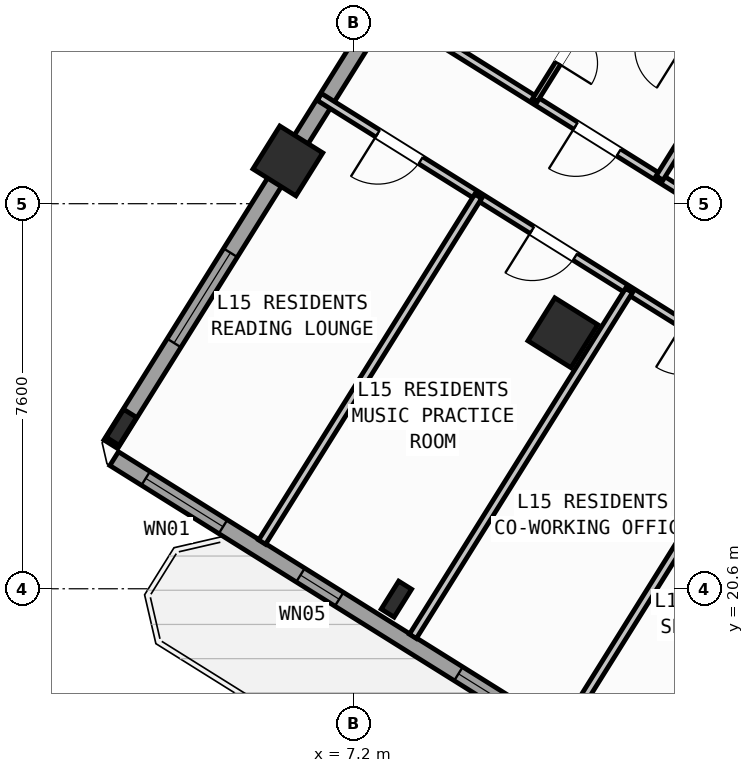
"""IFC4 building model, lengths in metres.
Left out: names, types, materials, properties, quantities, classifications, styles, units other than length and angle.
Written with IfcOpenShell. Run it as: python <this file> out.ifc"""

import sys

from ifc_helpers import new_model, si_unit, direction, frame, frame_2d, origin, origin_2d, place, context, subcontext, project, spatial, rectangle, hollow_rectangle, i_section, extrude, source, transform, mapped, element, fill, save


model = new_model("IFC4")
c1 = context("Model", 3, precision=1e-05, world=origin(), true_north=direction((0.0, 1.0)))
c2 = subcontext(c1, "Body", "Model", "MODEL_VIEW")
j1 = project(units=[si_unit("LENGTHUNIT", "METRE"), si_unit("PLANEANGLEUNIT", "RADIAN")], contexts=[c1])
p1 = place(None, origin())
s1 = spatial("IfcSite", under=j1, at=p1, CompositionType="ELEMENT")
p2 = place(p1, origin())
s2 = spatial("IfcBuilding", under=s1, at=p2, CompositionType="ELEMENT")
p3 = place(p2, frame((0.0, 0.0, 60.0)))
s3 = spatial("IfcBuildingStorey", under=s2, at=p3, CompositionType="ELEMENT", Elevation=60.0)
m1 = source(origin(), c2, "Body", "SweptSolid", [
    extrude(hollow_rectangle(XDim=1.0, YDim=1.0, WallThickness=0.04, at=origin_2d()), origin(), (0.0, 0.0, 1.0), 3.6),
])
p4 = place(p3, frame((11.336, 25.653, 0.0), z_axis=(0.0, 0.0, 1.0), x_axis=(-0.848048096156, 0.529919264233, 0.0)))
e1 = element("IfcColumn", 1, at=p4, inside=s3, PredefinedType="COLUMN", context=c2, shape_type="MappedRepresentation", body=[
    mapped(m1, transform((0.0, 0.0, 0.0), scale=1.0)),
])
m2 = source(origin(), c2, "Body", "SweptSolid", [
    extrude(i_section(OverallWidth=0.3, OverallDepth=0.65, WebThickness=0.016, FlangeThickness=0.031, at=origin_2d()), origin(), (0.0, 0.0, 1.0), 3.6),
])
p5 = place(p3, frame((8.051, 20.395, 0.0), z_axis=(0.0, 0.0, 1.0), x_axis=(-0.848048096156, 0.529919264233, 0.0)))
e2 = element("IfcColumn", 2, at=p5, inside=s3, PredefinedType="COLUMN", context=c2, shape_type="MappedRepresentation", body=[
    mapped(m2, transform((0.0, 0.0, 0.0), scale=1.0)),
])
p6 = place(p3, frame((5.909, 29.044, 0.0), z_axis=(0.0, 0.0, 1.0), x_axis=(-0.848048096156, 0.529919264233, 0.0)))
e3 = element("IfcColumn", 3, at=p6, inside=s3, PredefinedType="COLUMN", context=c2, shape_type="MappedRepresentation", body=[
    mapped(m1, transform((0.0, 0.0, 0.0), scale=1.0)),
])
p7 = place(p3, frame((2.623, 23.786, 0.0), z_axis=(0.0, 0.0, 1.0), x_axis=(-0.848048096156, 0.529919264233, 0.0)))
e4 = element("IfcColumn", 4, at=p7, inside=s3, PredefinedType="COLUMN", context=c2, shape_type="MappedRepresentation", body=[
    mapped(m2, transform((0.0, 0.0, 0.0), scale=1.0)),
])
p8 = place(p3, frame((29.268, 6.429, 0.0), z_axis=(0.0, 0.0, 1.0), x_axis=(-0.848049971435, 0.529916263149, 0.0)))
e5 = element("IfcWall", 5, at=p8, inside=s3, PredefinedType="STANDARD", context=c2, shape_type="SweptSolid", body=[
    extrude(rectangle(XDim=31.588, YDim=0.32, at=frame_2d((15.794, 0.0))), origin(), (0.0, 0.0, 1.0), 3.35),
])
p9 = place(p8, frame((16.235, 0.0, 0.0)))
e6 = element("IfcOpeningElement", 6, at=p9, cuts=e5, PredefinedType="OPENING", context=c2, shape_type="SweptSolid", body=[
    extrude(rectangle(XDim=1.2, YDim=2.15, at=frame_2d((0.6, 1.075))), frame((0.0, 0.17, 0.0), z_axis=(0.0, -1.0, 0.0), x_axis=(1.0, 0.0, 0.0)), (0.0, 0.0, 1.0), 0.34),
])
p10 = place(p8, frame((2.989, 0.0, 0.8)))
e7 = element("IfcOpeningElement", 7, at=p10, cuts=e5, PredefinedType="OPENING", context=c2, shape_type="SweptSolid", body=[
    extrude(rectangle(XDim=2.1, YDim=1.55, at=frame_2d((1.05, 0.775))), frame((0.0, 0.17, 0.0), z_axis=(0.0, -1.0, 0.0), x_axis=(1.0, 0.0, 0.0)), (0.0, 0.0, 1.0), 0.34),
])
p11 = place(p8, frame((8.359, 0.0, 0.8)))
e8 = element("IfcOpeningElement", 8, at=p11, cuts=e5, PredefinedType="OPENING", context=c2, shape_type="SweptSolid", body=[
    extrude(rectangle(XDim=2.1, YDim=1.55, at=frame_2d((1.05, 0.775))), frame((0.0, 0.17, 0.0), z_axis=(0.0, -1.0, 0.0), x_axis=(1.0, 0.0, 0.0)), (0.0, 0.0, 1.0), 0.34),
])
p12 = place(p8, frame((13.284, 0.0, 0.95)))
e9 = element("IfcOpeningElement", 9, at=p12, cuts=e5, PredefinedType="OPENING", context=c2, shape_type="SweptSolid", body=[
    extrude(rectangle(XDim=1.2, YDim=1.4, at=frame_2d((0.6, 0.7))), frame((0.0, 0.17, 0.0), z_axis=(0.0, -1.0, 0.0), x_axis=(1.0, 0.0, 0.0)), (0.0, 0.0, 1.0), 0.34),
])
p13 = place(p8, frame((22.374, 0.0, 0.95)))
e10 = element("IfcOpeningElement", 10, at=p13, cuts=e5, PredefinedType="OPENING", context=c2, shape_type="SweptSolid", body=[
    extrude(rectangle(XDim=1.2, YDim=1.4, at=frame_2d((0.6, 0.7))), frame((0.0, 0.17, 0.0), z_axis=(0.0, -1.0, 0.0), x_axis=(1.0, 0.0, 0.0)), (0.0, 0.0, 1.0), 0.34),
])
p14 = place(p8, frame((26.351, 0.0, 1.0)))
e11 = element("IfcOpeningElement", 11, at=p14, cuts=e5, PredefinedType="OPENING", context=c2, shape_type="SweptSolid", body=[
    extrude(rectangle(XDim=0.9, YDim=1.25, at=frame_2d((0.45, 0.625))), frame((0.0, 0.17, 0.0), z_axis=(0.0, -1.0, 0.0), x_axis=(1.0, 0.0, 0.0)), (0.0, 0.0, 1.0), 0.34),
])
p15 = place(p8, frame((29.052, 0.0, 0.85)))
e12 = element("IfcOpeningElement", 12, at=p15, cuts=e5, PredefinedType="OPENING", context=c2, shape_type="SweptSolid", body=[
    extrude(rectangle(XDim=1.8, YDim=1.5, at=frame_2d((0.9, 0.75))), frame((0.0, 0.17, 0.0), z_axis=(0.0, -1.0, 0.0), x_axis=(1.0, 0.0, 0.0)), (0.0, 0.0, 1.0), 0.34),
])
p16 = place(p3, frame((2.415, 23.452, 0.0), z_axis=(0.0, 0.0, 1.0), x_axis=(0.52991049553, 0.848053575387, 0.0)))
e13 = element("IfcWall", 13, at=p16, inside=s3, PredefinedType="STANDARD", context=c2, shape_type="SweptSolid", body=[
    extrude(rectangle(XDim=21.587, YDim=0.32, at=frame_2d((10.794, 0.0))), origin(), (0.0, 0.0, 1.0), 2.725),
])
p17 = place(p16, frame((2.356, 0.0, 0.8)))
e14 = element("IfcOpeningElement", 14, at=p17, cuts=e13, PredefinedType="OPENING", context=c2, shape_type="SweptSolid", body=[
    extrude(rectangle(XDim=2.1, YDim=1.55, at=frame_2d((1.05, 0.775))), frame((0.0, 0.17, 0.0), z_axis=(0.0, -1.0, 0.0), x_axis=(1.0, 0.0, 0.0)), (0.0, 0.0, 1.0), 0.34),
])
p18 = place(p16, frame((10.949, 0.0, 1.0)))
e15 = element("IfcOpeningElement", 15, at=p18, cuts=e13, PredefinedType="OPENING", context=c2, shape_type="SweptSolid", body=[
    extrude(rectangle(XDim=0.9, YDim=1.25, at=frame_2d((0.45, 0.625))), frame((0.0, 0.17, 0.0), z_axis=(0.0, -1.0, 0.0), x_axis=(1.0, 0.0, 0.0)), (0.0, 0.0, 1.0), 0.34),
])
p19 = place(p16, frame((15.394, 0.0, 0.85)))
e16 = element("IfcOpeningElement", 16, at=p19, cuts=e13, PredefinedType="OPENING", context=c2, shape_type="SweptSolid", body=[
    extrude(rectangle(XDim=1.5, YDim=1.5, at=frame_2d((0.75, 0.75))), frame((0.0, 0.17, 0.0), z_axis=(0.0, -1.0, 0.0), x_axis=(1.0, 0.0, 0.0)), (0.0, 0.0, 1.0), 0.34),
])
p20 = place(p16, frame((18.194, 0.0, 0.85)))
e17 = element("IfcOpeningElement", 17, at=p20, cuts=e13, PredefinedType="OPENING", context=c2, shape_type="SweptSolid", body=[
    extrude(rectangle(XDim=1.5, YDim=1.5, at=frame_2d((0.75, 0.75))), frame((0.0, 0.17, 0.0), z_axis=(0.0, -1.0, 0.0), x_axis=(1.0, 0.0, 0.0)), (0.0, 0.0, 1.0), 0.34),
])
p21 = place(p3, frame((21.885, 23.306, 0.0), z_axis=(0.0, 0.0, 1.0), x_axis=(-0.848052408131, 0.529912363569, 0.0)))
e18 = element("IfcWall", 18, at=p21, inside=s3, PredefinedType="PARTITIONING", context=c2, shape_type="SweptSolid", body=[
    extrude(rectangle(XDim=16.73, YDim=0.16, at=frame_2d((8.365, 0.0))), origin(), (0.0, 0.0, 1.0), 3.34),
])
p22 = place(p21, frame((1.395, 0.0, 0.0)))
e19 = element("IfcOpeningElement", 19, at=p22, cuts=e18, PredefinedType="OPENING", context=c2, shape_type="SweptSolid", body=[
    extrude(rectangle(XDim=1.0, YDim=2.1, at=frame_2d((0.5, 1.05))), frame((0.0, 0.09, 0.0), z_axis=(0.0, -1.0, 0.0), x_axis=(1.0, 0.0, 0.0)), (0.0, 0.0, 1.0), 0.18),
])
p23 = place(p21, frame((7.82, 0.0, 0.0)))
e20 = element("IfcOpeningElement", 20, at=p23, cuts=e18, PredefinedType="OPENING", context=c2, shape_type="SweptSolid", body=[
    extrude(rectangle(XDim=1.0, YDim=2.1, at=frame_2d((0.5, 1.05))), frame((0.0, 0.09, 0.0), z_axis=(0.0, -1.0, 0.0), x_axis=(1.0, 0.0, 0.0)), (0.0, 0.0, 1.0), 0.18),
])
p24 = place(p21, frame((11.14, 0.0, 0.0)))
e21 = element("IfcOpeningElement", 21, at=p24, cuts=e18, PredefinedType="OPENING", context=c2, shape_type="SweptSolid", body=[
    extrude(rectangle(XDim=1.0, YDim=2.1, at=frame_2d((0.5, 1.05))), frame((0.0, 0.09, 0.0), z_axis=(0.0, -1.0, 0.0), x_axis=(1.0, 0.0, 0.0)), (0.0, 0.0, 1.0), 0.18),
])
p25 = place(p3, frame((20.719, 21.44, 0.0), z_axis=(0.0, 0.0, 1.0), x_axis=(-0.848048310262, 0.529918921593, 0.0)))
e22 = element("IfcWall", 22, at=p25, inside=s3, PredefinedType="PARTITIONING", context=c2, shape_type="SweptSolid", body=[
    extrude(rectangle(XDim=16.73, YDim=0.16, at=frame_2d((8.365, 0.0))), origin(), (0.0, 0.0, 1.0), 3.34),
])
p26 = place(p25, frame((0.92, 0.0, 0.0)))
e23 = element("IfcOpeningElement", 23, at=p26, cuts=e22, PredefinedType="OPENING", context=c2, shape_type="SweptSolid", body=[
    extrude(rectangle(XDim=1.0, YDim=2.1, at=frame_2d((0.5, 1.05))), frame((0.0, 0.09, 0.0), z_axis=(0.0, -1.0, 0.0), x_axis=(1.0, 0.0, 0.0)), (0.0, 0.0, 1.0), 0.18),
])
p27 = place(p25, frame((4.408, 0.0, 0.0)))
e24 = element("IfcOpeningElement", 24, at=p27, cuts=e22, PredefinedType="OPENING", context=c2, shape_type="SweptSolid", body=[
    extrude(rectangle(XDim=1.0, YDim=2.1, at=frame_2d((0.5, 1.05))), frame((0.0, 0.09, 0.0), z_axis=(0.0, -1.0, 0.0), x_axis=(1.0, 0.0, 0.0)), (0.0, 0.0, 1.0), 0.18),
])
p28 = place(p25, frame((7.271, 0.0, 0.0)))
e25 = element("IfcOpeningElement", 25, at=p28, cuts=e22, PredefinedType="OPENING", context=c2, shape_type="SweptSolid", body=[
    extrude(rectangle(XDim=1.0, YDim=2.1, at=frame_2d((0.5, 1.05))), frame((0.0, 0.09, 0.0), z_axis=(0.0, -1.0, 0.0), x_axis=(1.0, 0.0, 0.0)), (0.0, 0.0, 1.0), 0.18),
])
p29 = place(p25, frame((10.78, 0.0, 0.0)))
e26 = element("IfcOpeningElement", 26, at=p29, cuts=e22, PredefinedType="OPENING", context=c2, shape_type="SweptSolid", body=[
    extrude(rectangle(XDim=1.0, YDim=2.1, at=frame_2d((0.5, 1.05))), frame((0.0, 0.09, 0.0), z_axis=(0.0, -1.0, 0.0), x_axis=(1.0, 0.0, 0.0)), (0.0, 0.0, 1.0), 0.18),
])
p30 = place(p25, frame((14.372, 0.0, 0.0)))
e27 = element("IfcOpeningElement", 27, at=p30, cuts=e22, PredefinedType="OPENING", context=c2, shape_type="SweptSolid", body=[
    extrude(rectangle(XDim=1.0, YDim=2.1, at=frame_2d((0.5, 1.05))), frame((0.0, 0.09, 0.0), z_axis=(0.0, -1.0, 0.0), x_axis=(1.0, 0.0, 0.0)), (0.0, 0.0, 1.0), 0.18),
])
p31 = place(p3, frame((15.618, 24.628, 0.0), z_axis=(0.0, 0.0, 1.0), x_axis=(-0.529928058306, -0.848042600947, 0.0)))
e28 = element("IfcWall", 28, at=p31, inside=s3, PredefinedType="PARTITIONING", context=c2, shape_type="SweptSolid", body=[
    extrude(rectangle(XDim=8.05, YDim=0.16, at=frame_2d((4.025, 0.0))), origin(), (0.0, 0.0, 1.0), 2.995),
])
p32 = place(p3, frame((12.642, 26.488, 0.0), z_axis=(0.0, 0.0, 1.0), x_axis=(-0.529914428959, -0.848051117552, 0.0)))
e29 = element("IfcWall", 29, at=p32, inside=s3, PredefinedType="PARTITIONING", context=c2, shape_type="SweptSolid", body=[
    extrude(rectangle(XDim=8.05, YDim=0.16, at=frame_2d((4.025, 0.0))), origin(), (0.0, 0.0, 1.0), 3.34),
])
p33 = place(p3, frame((9.666, 28.347, 0.0), z_axis=(0.0, 0.0, 1.0), x_axis=(-0.529928058306, -0.848042600947, 0.0)))
e30 = element("IfcWall", 30, at=p33, inside=s3, PredefinedType="PARTITIONING", context=c2, shape_type="SweptSolid", body=[
    extrude(rectangle(XDim=8.05, YDim=0.16, at=frame_2d((4.025, 0.0))), origin(), (0.0, 0.0, 1.0), 3.34),
])
p34 = place(p3, frame((14.933, 31.409, 0.0), z_axis=(0.0, 0.0, 1.0), x_axis=(-0.529875025416, -0.848075738033, 0.0)))
e31 = element("IfcWall", 31, at=p34, inside=s3, PredefinedType="PARTITIONING", context=c2, shape_type="SweptSolid", body=[
    extrude(rectangle(XDim=3.188, YDim=0.16, at=frame_2d((1.594, 0.0))), origin(), (0.0, 0.0, 1.0), 2.725),
])
p35 = place(p3, frame((16.995, 40.182, 0.0), z_axis=(0.0, 0.0, 1.0), x_axis=(-0.529927783988, -0.848042772363, 0.0)))
e32 = element("IfcWall", 32, at=p35, inside=s3, PredefinedType="PARTITIONING", context=c2, shape_type="SweptSolid", body=[
    extrude(rectangle(XDim=11.72, YDim=0.11, at=frame_2d((5.86, 0.0))), origin(), (0.0, 0.0, 1.0), 3.34),
])
p36 = place(p35, frame((10.08, 0.0, 0.0)))
e33 = element("IfcOpeningElement", 33, at=p36, cuts=e32, PredefinedType="OPENING", context=c2, shape_type="SweptSolid", body=[
    extrude(rectangle(XDim=0.78, YDim=2.05, at=frame_2d((0.39, 1.025))), frame((0.0, 0.065, 0.0), z_axis=(0.0, -1.0, 0.0), x_axis=(1.0, 0.0, 0.0)), (0.0, 0.0, 1.0), 0.13),
])
p37 = place(p35, frame((4.2, 0.0, 0.0)))
e34 = element("IfcOpeningElement", 34, at=p37, cuts=e32, PredefinedType="OPENING", context=c2, shape_type="SweptSolid", body=[
    extrude(rectangle(XDim=0.92, YDim=2.08, at=frame_2d((0.46, 1.04))), frame((0.0, 0.065, 0.0), z_axis=(0.0, -1.0, 0.0), x_axis=(1.0, 0.0, 0.0)), (0.0, 0.0, 1.0), 0.13),
])
p38 = place(p3, frame((14.516, 30.741, 0.0), z_axis=(0.0, 0.0, 1.0), x_axis=(-0.848059786386, 0.529900555496, 0.0)))
e35 = element("IfcWall", 35, at=p38, inside=s3, PredefinedType="PLUMBINGWALL", context=c2, shape_type="SweptSolid", body=[
    extrude(rectangle(XDim=2.9, YDim=0.14, at=frame_2d((1.45, 0.0))), origin(), (0.0, 0.0, 1.0), 3.34),
])
p39 = place(p38, frame((0.99, 0.0, 0.0)))
e36 = element("IfcOpeningElement", 36, at=p39, cuts=e35, PredefinedType="OPENING", context=c2, shape_type="SweptSolid", body=[
    extrude(rectangle(XDim=0.92, YDim=2.08, at=frame_2d((0.46, 1.04))), frame((0.0, 0.08, 0.0), z_axis=(0.0, -1.0, 0.0), x_axis=(1.0, 0.0, 0.0)), (0.0, 0.0, 1.0), 0.16),
])
m3 = source(origin(), c2, "Body", "SweptSolid", [
    extrude(rectangle(XDim=1.2, YDim=1.4, at=frame_2d((0.6, 0.7))), frame((0.0, 0.03, 0.0), z_axis=(0.0, -1.0, 0.0), x_axis=(1.0, 0.0, 0.0)), (0.0, 0.0, 1.0), 0.06),
])
p40 = place(p13, origin())
e37 = element("IfcWindow", 37, at=p40, inside=s3, PartitioningType="SINGLE_PANEL", PredefinedType="WINDOW", context=c2, shape_type="MappedRepresentation", body=[
    mapped(m3, transform((0.0, 0.0, 0.0), scale=1.0)),
])
fill(e10, e37)
m4 = source(origin(), c2, "Body", "SweptSolid", [
    extrude(rectangle(XDim=0.9, YDim=1.25, at=frame_2d((0.45, 0.625))), frame((0.0, 0.03, 0.0), z_axis=(0.0, -1.0, 0.0), x_axis=(1.0, 0.0, 0.0)), (0.0, 0.0, 1.0), 0.06),
])
p41 = place(p14, origin())
e38 = element("IfcWindow", 38, at=p41, inside=s3, PartitioningType="SINGLE_PANEL", PredefinedType="WINDOW", context=c2, shape_type="MappedRepresentation", body=[
    mapped(m4, transform((0.0, 0.0, 0.0), scale=1.0)),
])
fill(e11, e38)
m5 = source(origin(), c2, "Body", "SweptSolid", [
    extrude(rectangle(XDim=1.8, YDim=1.5, at=frame_2d((0.9, 0.75))), frame((0.0, 0.03, 0.0), z_axis=(0.0, -1.0, 0.0), x_axis=(1.0, 0.0, 0.0)), (0.0, 0.0, 1.0), 0.06),
])
p42 = place(p15, origin())
e39 = element("IfcWindow", 39, at=p42, inside=s3, PartitioningType="SINGLE_PANEL", PredefinedType="WINDOW", context=c2, shape_type="MappedRepresentation", body=[
    mapped(m5, transform((0.0, 0.0, 0.0), scale=1.0)),
])
fill(e12, e39)
m6 = source(origin(), c2, "Body", "SweptSolid", [
    extrude(rectangle(XDim=2.1, YDim=1.55, at=frame_2d((1.05, 0.775))), frame((0.0, 0.03, 0.0), z_axis=(0.0, -1.0, 0.0), x_axis=(1.0, 0.0, 0.0)), (0.0, 0.0, 1.0), 0.06),
])
p43 = place(p17, origin())
e40 = element("IfcWindow", 40, at=p43, inside=s3, PartitioningType="SINGLE_PANEL", PredefinedType="WINDOW", context=c2, shape_type="MappedRepresentation", body=[
    mapped(m6, transform((0.0, 0.0, 0.0), scale=1.0)),
])
fill(e14, e40)
m7 = source(origin(), c2, "Body", "SweptSolid", [
    extrude(rectangle(XDim=1.0, YDim=2.1, at=frame_2d((0.5, 1.05))), frame((0.0, 0.025, 0.0), z_axis=(0.0, -1.0, 0.0), x_axis=(1.0, 0.0, 0.0)), (0.0, 0.0, 1.0), 0.05),
])
p44 = place(p29, origin())
e41 = element("IfcDoor", 41, at=p44, inside=s3, OperationType="SINGLE_SWING_RIGHT", PredefinedType="DOOR", context=c2, shape_type="MappedRepresentation", body=[
    mapped(m7, transform((0.0, 0.0, 0.0), scale=1.0)),
])
fill(e26, e41)
p45 = place(p30, origin())
e42 = element("IfcDoor", 42, at=p45, inside=s3, OperationType="SINGLE_SWING_RIGHT", PredefinedType="DOOR", context=c2, shape_type="MappedRepresentation", body=[
    mapped(m7, transform((0.0, 0.0, 0.0), scale=1.0)),
])
fill(e27, e42)
p46 = place(p24, origin())
e43 = element("IfcDoor", 43, at=p46, inside=s3, OperationType="SINGLE_SWING_RIGHT", PredefinedType="DOOR", context=c2, shape_type="MappedRepresentation", body=[
    mapped(m7, transform((0.0, 0.0, 0.0), scale=1.0)),
])
fill(e21, e43)
m8 = source(origin(), c2, "Body", "SweptSolid", [
    extrude(rectangle(XDim=0.78, YDim=2.05, at=frame_2d((0.39, 1.025))), frame((0.0, 0.025, 0.0), z_axis=(0.0, -1.0, 0.0), x_axis=(1.0, 0.0, 0.0)), (0.0, 0.0, 1.0), 0.05),
])
p47 = place(p36, origin())
e44 = element("IfcDoor", 44, at=p47, inside=s3, OperationType="SINGLE_SWING_RIGHT", PredefinedType="DOOR", context=c2, shape_type="MappedRepresentation", body=[
    mapped(m8, transform((0.0, 0.0, 0.0), scale=1.0)),
])
fill(e33, e44)
save(model, sys.argv[1])
